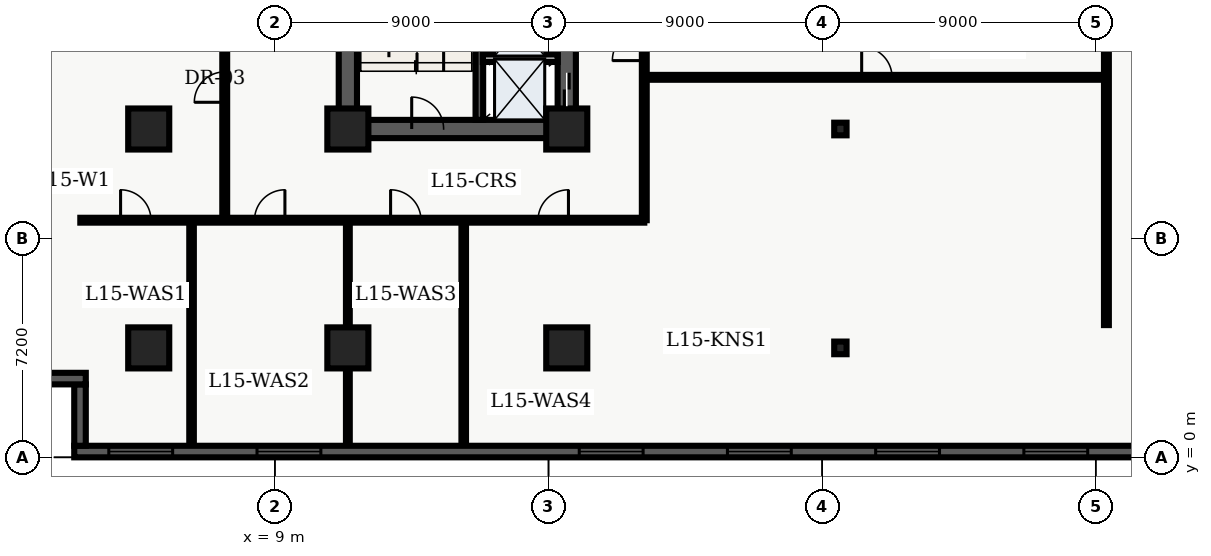
"""IFC4 building model, lengths in metres.
Left out: names, types, materials, properties, quantities, classifications, styles, units other than length and angle.
Written with IfcOpenShell. Run it as: python <this file> out.ifc"""

import sys

from ifc_helpers import new_model, entity, si_unit, converted_unit, direction, frame, origin_with_axes, origin_2d_with_axis, place, context, subcontext, project, spatial, polyline, rectangle, i_section, outline, extrude, element, fill, save


model = new_model("IFC4")
c1 = context("Model", 3, precision=1e-05, world=origin_with_axes(), true_north=direction((0.0, 1.0)))
c2 = subcontext(c1, "Body", "Model", "MODEL_VIEW")
j1 = project(units=[si_unit("LENGTHUNIT", "METRE"), converted_unit("PLANEANGLEUNIT", "DEGREE", entity("IfcPlaneAngleMeasure", 0.017), si_unit("PLANEANGLEUNIT", "RADIAN"), dimensions=[0, 0, 0, 0, 0, 0, 0])], contexts=[c1])
p1 = place(None, origin_with_axes())
s1 = spatial("IfcSite", under=j1, at=p1, CompositionType="ELEMENT")
p2 = place(p1, origin_with_axes())
s2 = spatial("IfcBuilding", under=s1, at=p2, CompositionType="ELEMENT")
p3 = place(p2, frame((0.0, 0.0, 63.9), z_axis=(0.0, 0.0, 1.0), x_axis=(1.0, 0.0, 0.0)))
s3 = spatial("IfcBuildingStorey", under=s2, at=p3, CompositionType="ELEMENT", Elevation=63.9)
p4 = place(p3, frame((11.4, 10.8, 0.0), z_axis=(0.0, 0.0, 1.0), x_axis=(0.0, 1.0, 0.0)))
e1 = element("IfcWall", 1, at=p4, inside=s3, PredefinedType="SHEAR", context=c2, shape_type="SweptSolid", body=[
    extrude(outline(polyline([(0.0, -0.3), (27.0, -0.3), (27.0, 0.3), (0.0, 0.3), (0.0, -0.3)])), origin_with_axes(), (0.0, 0.0, 1.0), 3.66),
])
p5 = place(p3, frame((11.4, 10.8, 0.0), z_axis=(0.0, 0.0, 1.0), x_axis=(1.0, 0.0, 0.0)))
e2 = element("IfcWall", 2, at=p5, inside=s3, PredefinedType="SHEAR", context=c2, shape_type="SweptSolid", body=[
    extrude(outline(polyline([(0.0, -0.3), (7.2, -0.3), (7.2, 0.3), (0.0, 0.3), (0.0, -0.3)])), origin_with_axes(), (0.0, 0.0, 1.0), 3.66),
])
p6 = place(p5, frame((2.625, 0.0, 0.0), z_axis=(0.0, 0.0, 1.0), x_axis=(1.0, 0.0, 0.0)))
e3 = element("IfcOpeningElement", 3, at=p6, cuts=e2, PredefinedType="OPENING", context=c2, shape_type="SweptSolid", body=[
    extrude(rectangle(XDim=1.05, YDim=0.62, at=origin_2d_with_axis()), origin_with_axes(), (0.0, 0.0, 1.0), 2.15),
])
p7 = place(p3, frame((18.6, 10.8, 0.0), z_axis=(0.0, 0.0, 1.0), x_axis=(0.0, 1.0, 0.0)))
e4 = element("IfcWall", 4, at=p7, inside=s3, PredefinedType="SHEAR", context=c2, shape_type="SweptSolid", body=[
    extrude(outline(polyline([(0.0, -0.3), (13.5, -0.3), (13.5, 0.3), (0.0, 0.3), (0.0, -0.3)])), origin_with_axes(), (0.0, 0.0, 1.0), 3.66),
])
p8 = place(p7, frame((1.3, 0.0, 0.0), z_axis=(0.0, 0.0, 1.0), x_axis=(1.0, 0.0, 0.0)))
e5 = element("IfcOpeningElement", 5, at=p8, cuts=e4, PredefinedType="OPENING", context=c2, shape_type="SweptSolid", body=[
    extrude(rectangle(XDim=1.1, YDim=0.62, at=origin_2d_with_axis()), origin_with_axes(), (0.0, 0.0, 1.0), 2.15),
])
p9 = place(p7, frame((3.4, 0.0, 0.0), z_axis=(0.0, 0.0, 1.0), x_axis=(1.0, 0.0, 0.0)))
e6 = element("IfcOpeningElement", 6, at=p9, cuts=e4, PredefinedType="OPENING", context=c2, shape_type="SweptSolid", body=[
    extrude(rectangle(XDim=1.1, YDim=0.62, at=origin_2d_with_axis()), origin_with_axes(), (0.0, 0.0, 1.0), 2.15),
])
p10 = place(p7, frame((11.125, 0.0, 0.0), z_axis=(0.0, 0.0, 1.0), x_axis=(1.0, 0.0, 0.0)))
e7 = element("IfcOpeningElement", 7, at=p10, cuts=e4, PredefinedType="OPENING", context=c2, shape_type="SweptSolid", body=[
    extrude(rectangle(XDim=1.05, YDim=0.62, at=origin_2d_with_axis()), origin_with_axes(), (0.0, 0.0, 1.0), 2.15),
])
p11 = place(p3, frame((15.725, 11.1, 0.0), z_axis=(0.0, 0.0, 1.0), x_axis=(0.0, 1.0, 0.0)))
e8 = element("IfcWall", 8, at=p11, inside=s3, PredefinedType="SHEAR", context=c2, shape_type="SweptSolid", body=[
    extrude(outline(polyline([(0.0, -0.125), (8.6, -0.125), (8.6, 0.125), (0.0, 0.125), (0.0, -0.125)])), origin_with_axes(), (0.0, 0.0, 1.0), 3.66),
])
for number, where, z_axis, x_axis in (
    (9, (11.4, 3.6, 0.0), (0.0, 0.0, 1.0), (1.0, 0.0, 0.0)),
    (10, (11.4, 10.8, 0.0), (0.0, 0.0, 1.0), (1.0, 0.0, 0.0)),
    (11, (18.6, 3.6, 0.0), (0.0, 0.0, 1.0), (1.0, 0.0, 0.0)),
    (12, (18.6, 10.8, 0.0), (0.0, 0.0, 1.0), (1.0, 0.0, 0.0)),
    (13, (4.85, 3.6, 0.0), (0.0, 0.0, 1.0), (1.0, 0.0, 0.0)),
    (14, (4.85, 10.8, 0.0), (0.0, 0.0, 1.0), (1.0, 0.0, 0.0)),
):
    element("IfcColumn", number, at=place(p3, frame(where, z_axis=z_axis, x_axis=x_axis)), inside=s3, PredefinedType="COLUMN", context=c2, shape_type="SweptSolid", body=[
        extrude(rectangle(XDim=1.35, YDim=1.35, at=origin_2d_with_axis()), origin_with_axes(), (0.0, 0.0, 1.0), 3.9),
    ])
for number, where, z_axis, x_axis in (
    (15, (27.6, 3.6, 0.0), (0.0, 0.0, 1.0), (1.0, 0.0, 0.0)),
    (16, (27.6, 10.8, 0.0), (0.0, 0.0, 1.0), (1.0, 0.0, 0.0)),
):
    element("IfcColumn", number, at=place(p3, frame(where, z_axis=z_axis, x_axis=x_axis)), inside=s3, PredefinedType="COLUMN", context=c2, shape_type="SweptSolid", body=[
        extrude(i_section(OverallWidth=0.406, OverallDepth=0.416, WebThickness=0.03, FlangeThickness=0.048, FilletRadius=0.022, at=origin_2d_with_axis()), origin_with_axes(), (0.0, 0.0, 1.0), 3.9),
    ])
p12 = place(p3, frame((15.84, 13.13, 0.0), z_axis=(0.0, 0.0, 1.0), x_axis=(1.0, 0.0, 0.0)))
e17 = element("IfcWall", 17, at=p12, inside=s3, PredefinedType="SOLIDWALL", context=c2, shape_type="SweptSolid", body=[
    extrude(outline(polyline([(0.0, -0.125), (2.46, -0.125), (2.46, 0.125), (0.0, 0.125), (0.0, -0.125)])), origin_with_axes(), (0.0, 0.0, 1.0), 2.7),
])
p13 = place(p3, frame((2.6, 7.8, 0.0), z_axis=(0.0, 0.0, 1.0), x_axis=(1.0, 0.0, 0.0)))
e18 = element("IfcWall", 18, at=p13, inside=s3, PredefinedType="PARTITIONING", context=c2, shape_type="SweptSolid", body=[
    extrude(outline(polyline([(0.0, -0.08), (18.55, -0.08), (18.55, 0.08), (0.0, 0.08), (0.0, -0.08)])), origin_with_axes(), (0.0, 0.0, 1.0), 2.7),
])
p14 = place(p13, frame((1.825, 0.0, 0.0), z_axis=(0.0, 0.0, 1.0), x_axis=(1.0, 0.0, 0.0)))
e19 = element("IfcOpeningElement", 19, at=p14, cuts=e18, PredefinedType="OPENING", context=c2, shape_type="SweptSolid", body=[
    extrude(rectangle(XDim=1.0, YDim=0.18, at=origin_2d_with_axis()), origin_with_axes(), (0.0, 0.0, 1.0), 2.15),
])
p15 = place(p13, frame((6.229, 0.0, 0.0), z_axis=(0.0, 0.0, 1.0), x_axis=(1.0, 0.0, 0.0)))
e20 = element("IfcOpeningElement", 20, at=p15, cuts=e18, PredefinedType="OPENING", context=c2, shape_type="SweptSolid", body=[
    extrude(rectangle(XDim=1.0, YDim=0.18, at=origin_2d_with_axis()), origin_with_axes(), (0.0, 0.0, 1.0), 2.15),
])
p16 = place(p13, frame((10.706, 0.0, 0.0), z_axis=(0.0, 0.0, 1.0), x_axis=(1.0, 0.0, 0.0)))
e21 = element("IfcOpeningElement", 21, at=p16, cuts=e18, PredefinedType="OPENING", context=c2, shape_type="SweptSolid", body=[
    extrude(rectangle(XDim=1.0, YDim=0.18, at=origin_2d_with_axis()), origin_with_axes(), (0.0, 0.0, 1.0), 2.15),
])
p17 = place(p13, frame((15.556, 0.0, 0.0), z_axis=(0.0, 0.0, 1.0), x_axis=(1.0, 0.0, 0.0)))
e22 = element("IfcOpeningElement", 22, at=p17, cuts=e18, PredefinedType="OPENING", context=c2, shape_type="SweptSolid", body=[
    extrude(rectangle(XDim=1.0, YDim=0.18, at=origin_2d_with_axis()), origin_with_axes(), (0.0, 0.0, 1.0), 2.15),
])
p18 = place(p3, frame((21.15, 7.8, 0.0), z_axis=(0.0, 0.0, 1.0), x_axis=(0.0, 1.0, 0.0)))
e23 = element("IfcWall", 23, at=p18, inside=s3, PredefinedType="PARTITIONING", context=c2, shape_type="SweptSolid", body=[
    extrude(outline(polyline([(0.0, -0.08), (32.7, -0.08), (32.7, 0.08), (0.0, 0.08), (0.0, -0.08)])), origin_with_axes(), (0.0, 0.0, 1.0), 2.7),
])
p19 = place(p18, frame((5.775, 0.0, 0.0), z_axis=(0.0, 0.0, 1.0), x_axis=(1.0, 0.0, 0.0)))
e24 = element("IfcOpeningElement", 24, at=p19, cuts=e23, PredefinedType="OPENING", context=c2, shape_type="SweptSolid", body=[
    extrude(rectangle(XDim=1.05, YDim=0.18, at=origin_2d_with_axis()), origin_with_axes(), (0.0, 0.0, 1.0), 2.15),
])
p20 = place(p3, frame((7.35, 7.8, 0.0), z_axis=(0.0, 0.0, 1.0), x_axis=(0.0, 1.0, 0.0)))
e25 = element("IfcWall", 25, at=p20, inside=s3, PredefinedType="PARTITIONING", context=c2, shape_type="SweptSolid", body=[
    extrude(outline(polyline([(0.0, -0.08), (32.7, -0.08), (32.7, 0.08), (0.0, 0.08), (0.0, -0.08)])), origin_with_axes(), (0.0, 0.0, 1.0), 2.7),
])
p21 = place(p20, frame((4.379, 0.0, 0.0), z_axis=(0.0, 0.0, 1.0), x_axis=(1.0, 0.0, 0.0)))
e26 = element("IfcOpeningElement", 26, at=p21, cuts=e25, PredefinedType="OPENING", context=c2, shape_type="SweptSolid", body=[
    extrude(rectangle(XDim=1.0, YDim=0.18, at=origin_2d_with_axis()), origin_with_axes(), (0.0, 0.0, 1.0), 2.15),
])
p22 = place(p20, frame((14.008, 0.0, 0.0), z_axis=(0.0, 0.0, 1.0), x_axis=(1.0, 0.0, 0.0)))
e27 = element("IfcOpeningElement", 27, at=p22, cuts=e25, PredefinedType="OPENING", context=c2, shape_type="SweptSolid", body=[
    extrude(rectangle(XDim=1.0, YDim=0.18, at=origin_2d_with_axis()), origin_with_axes(), (0.0, 0.0, 1.0), 2.15),
])
p23 = place(p20, frame((25.979, 0.0, 0.0), z_axis=(0.0, 0.0, 1.0), x_axis=(1.0, 0.0, 0.0)))
e28 = element("IfcOpeningElement", 28, at=p23, cuts=e25, PredefinedType="OPENING", context=c2, shape_type="SweptSolid", body=[
    extrude(rectangle(XDim=1.0, YDim=0.18, at=origin_2d_with_axis()), origin_with_axes(), (0.0, 0.0, 1.0), 2.15),
])
p24 = place(p3, frame((6.259, 0.36, 0.0), z_axis=(0.0, 0.0, 1.0), x_axis=(0.0, 1.0, 0.0)))
e29 = element("IfcWall", 29, at=p24, inside=s3, PredefinedType="PARTITIONING", context=c2, shape_type="SweptSolid", body=[
    extrude(outline(polyline([(0.0, -0.075), (7.34, -0.075), (7.34, 0.075), (0.0, 0.075), (0.0, -0.075)])), origin_with_axes(), (0.0, 0.0, 1.0), 2.7),
])
p25 = place(p3, frame((11.4, 0.36, 0.0), z_axis=(0.0, 0.0, 1.0), x_axis=(0.0, 1.0, 0.0)))
e30 = element("IfcWall", 30, at=p25, inside=s3, PredefinedType="PARTITIONING", context=c2, shape_type="SweptSolid", body=[
    extrude(outline(polyline([(0.0, -0.062), (7.34, -0.062), (7.34, 0.062), (0.0, 0.062), (0.0, -0.062)])), origin_with_axes(), (0.0, 0.0, 1.0), 2.7),
])
p26 = place(p3, frame((15.211, 0.36, 0.0), z_axis=(0.0, 0.0, 1.0), x_axis=(0.0, 1.0, 0.0)))
e31 = element("IfcWall", 31, at=p26, inside=s3, PredefinedType="PARTITIONING", context=c2, shape_type="SweptSolid", body=[
    extrude(outline(polyline([(0.0, -0.075), (7.34, -0.075), (7.34, 0.075), (0.0, 0.075), (0.0, -0.075)])), origin_with_axes(), (0.0, 0.0, 1.0), 2.7),
])
p27 = place(p3, frame((21.15, 12.5, 0.0), z_axis=(0.0, 0.0, 1.0), x_axis=(1.0, 0.0, 0.0)))
e32 = element("IfcWall", 32, at=p27, inside=s3, PredefinedType="PARTITIONING", context=c2, shape_type="SweptSolid", body=[
    extrude(outline(polyline([(0.0, -0.08), (15.2, -0.08), (15.2, 0.08), (0.0, 0.08), (0.0, -0.08)])), origin_with_axes(), (0.0, 0.0, 1.0), 2.7),
])
p28 = place(p27, frame((7.65, 0.0, 0.0), z_axis=(0.0, 0.0, 1.0), x_axis=(1.0, 0.0, 0.0)))
e33 = element("IfcOpeningElement", 33, at=p28, cuts=e32, PredefinedType="OPENING", context=c2, shape_type="SweptSolid", body=[
    extrude(rectangle(XDim=1.0, YDim=0.18, at=origin_2d_with_axis()), origin_with_axes(), (0.0, 0.0, 1.0), 2.15),
])
p29 = place(p3, frame((36.35, 4.35, 0.0), z_axis=(0.0, 0.0, 1.0), x_axis=(0.0, 1.0, 0.0)))
e34 = element("IfcWall", 34, at=p29, inside=s3, PredefinedType="PARTITIONING", context=c2, shape_type="SweptSolid", body=[
    extrude(outline(polyline([(0.0, -0.08), (16.95, -0.08), (16.95, 0.08), (0.0, 0.08), (0.0, -0.08)])), origin_with_axes(), (0.0, 0.0, 1.0), 2.7),
])
p30 = place(p3, frame((57.22, 0.19, 0.0), z_axis=(0.0, 0.0, 1.0), x_axis=(-1.0, 0.0, 0.0)))
e35 = element("IfcWall", 35, at=p30, inside=s3, PredefinedType="SOLIDWALL", context=c2, shape_type="SweptSolid", body=[
    extrude(outline(polyline([(0.0, -0.19), (54.82, -0.19), (54.82, 0.19), (0.0, 0.19), (0.0, -0.19)])), origin_with_axes(), (0.0, 0.0, 1.0), 3.66),
])
p31 = place(p30, frame((3.037, 0.0, 0.45), z_axis=(0.0, 0.0, 1.0), x_axis=(1.0, 0.0, 0.0)))
e36 = element("IfcOpeningElement", 36, at=p31, cuts=e35, PredefinedType="OPENING", context=c2, shape_type="SweptSolid", body=[
    extrude(rectangle(XDim=2.1, YDim=0.4, at=origin_2d_with_axis()), origin_with_axes(), (0.0, 0.0, 1.0), 2.2),
])
p32 = place(p30, frame((7.912, 0.0, 0.45), z_axis=(0.0, 0.0, 1.0), x_axis=(1.0, 0.0, 0.0)))
e37 = element("IfcOpeningElement", 37, at=p32, cuts=e35, PredefinedType="OPENING", context=c2, shape_type="SweptSolid", body=[
    extrude(rectangle(XDim=2.1, YDim=0.4, at=origin_2d_with_axis()), origin_with_axes(), (0.0, 0.0, 1.0), 2.2),
])
p33 = place(p30, frame((12.786, 0.0, 0.45), z_axis=(0.0, 0.0, 1.0), x_axis=(1.0, 0.0, 0.0)))
e38 = element("IfcOpeningElement", 38, at=p33, cuts=e35, PredefinedType="OPENING", context=c2, shape_type="SweptSolid", body=[
    extrude(rectangle(XDim=2.1, YDim=0.4, at=origin_2d_with_axis()), origin_with_axes(), (0.0, 0.0, 1.0), 2.2),
])
p34 = place(p30, frame((17.661, 0.0, 0.45), z_axis=(0.0, 0.0, 1.0), x_axis=(1.0, 0.0, 0.0)))
e39 = element("IfcOpeningElement", 39, at=p34, cuts=e35, PredefinedType="OPENING", context=c2, shape_type="SweptSolid", body=[
    extrude(rectangle(XDim=2.1, YDim=0.4, at=origin_2d_with_axis()), origin_with_axes(), (0.0, 0.0, 1.0), 2.2),
])
p35 = place(p30, frame((22.535, 0.0, 0.45), z_axis=(0.0, 0.0, 1.0), x_axis=(1.0, 0.0, 0.0)))
e40 = element("IfcOpeningElement", 40, at=p35, cuts=e35, PredefinedType="OPENING", context=c2, shape_type="SweptSolid", body=[
    extrude(rectangle(XDim=2.1, YDim=0.4, at=origin_2d_with_axis()), origin_with_axes(), (0.0, 0.0, 1.0), 2.2),
])
p36 = place(p30, frame((27.41, 0.0, 0.45), z_axis=(0.0, 0.0, 1.0), x_axis=(1.0, 0.0, 0.0)))
e41 = element("IfcOpeningElement", 41, at=p36, cuts=e35, PredefinedType="OPENING", context=c2, shape_type="SweptSolid", body=[
    extrude(rectangle(XDim=2.1, YDim=0.4, at=origin_2d_with_axis()), origin_with_axes(), (0.0, 0.0, 1.0), 2.2),
])
p37 = place(p30, frame((32.285, 0.0, 0.45), z_axis=(0.0, 0.0, 1.0), x_axis=(1.0, 0.0, 0.0)))
e42 = element("IfcOpeningElement", 42, at=p37, cuts=e35, PredefinedType="OPENING", context=c2, shape_type="SweptSolid", body=[
    extrude(rectangle(XDim=2.1, YDim=0.4, at=origin_2d_with_axis()), origin_with_axes(), (0.0, 0.0, 1.0), 2.2),
])
p38 = place(p30, frame((37.159, 0.0, 0.45), z_axis=(0.0, 0.0, 1.0), x_axis=(1.0, 0.0, 0.0)))
e43 = element("IfcOpeningElement", 43, at=p38, cuts=e35, PredefinedType="OPENING", context=c2, shape_type="SweptSolid", body=[
    extrude(rectangle(XDim=2.1, YDim=0.4, at=origin_2d_with_axis()), origin_with_axes(), (0.0, 0.0, 1.0), 2.2),
])
p39 = place(p30, frame((47.758, 0.0, 0.45), z_axis=(0.0, 0.0, 1.0), x_axis=(1.0, 0.0, 0.0)))
e44 = element("IfcOpeningElement", 44, at=p39, cuts=e35, PredefinedType="OPENING", context=c2, shape_type="SweptSolid", body=[
    extrude(rectangle(XDim=2.1, YDim=0.4, at=origin_2d_with_axis()), origin_with_axes(), (0.0, 0.0, 1.0), 2.2),
])
p40 = place(p30, frame((52.633, 0.0, 0.45), z_axis=(0.0, 0.0, 1.0), x_axis=(1.0, 0.0, 0.0)))
e45 = element("IfcOpeningElement", 45, at=p40, cuts=e35, PredefinedType="OPENING", context=c2, shape_type="SweptSolid", body=[
    extrude(rectangle(XDim=2.1, YDim=0.4, at=origin_2d_with_axis()), origin_with_axes(), (0.0, 0.0, 1.0), 2.2),
])
p41 = place(p3, frame((2.59, 0.38, 0.0), z_axis=(0.0, 0.0, 1.0), x_axis=(0.0, 1.0, 0.0)))
e46 = element("IfcWall", 46, at=p41, inside=s3, PredefinedType="SOLIDWALL", context=c2, shape_type="SweptSolid", body=[
    extrude(outline(polyline([(0.0, -0.19), (2.02, -0.19), (2.02, 0.19), (0.0, 0.19), (0.0, -0.19)])), origin_with_axes(), (0.0, 0.0, 1.0), 3.66),
])
p42 = place(p3, frame((2.78, 2.59, 0.0), z_axis=(0.0, 0.0, 1.0), x_axis=(-1.0, 0.0, 0.0)))
e47 = element("IfcWall", 47, at=p42, inside=s3, PredefinedType="SOLIDWALL", context=c2, shape_type="SweptSolid", body=[
    extrude(outline(polyline([(0.0, -0.19), (2.78, -0.19), (2.78, 0.19), (0.0, 0.19), (0.0, -0.19)])), origin_with_axes(), (0.0, 0.0, 1.0), 3.66),
])
p43 = place(p7, frame((1.3, 0.0, 0.0), z_axis=(0.0, 0.0, 1.0), x_axis=(1.0, 0.0, 0.0)))
e48 = element("IfcDoor", 48, at=p43, inside=s3, OperationType="SLIDING_TO_LEFT", PredefinedType="DOOR", context=c2, shape_type="SweptSolid", body=[
    extrude(rectangle(XDim=1.1, YDim=0.09, at=origin_2d_with_axis()), origin_with_axes(), (0.0, 0.0, 1.0), 2.15),
])
fill(e5, e48)
p44 = place(p5, frame((2.625, 0.0, 0.0), z_axis=(0.0, 0.0, 1.0), x_axis=(1.0, 0.0, 0.0)))
e49 = element("IfcDoor", 49, at=p44, inside=s3, OperationType="SINGLE_SWING_LEFT", PredefinedType="DOOR", context=c2, shape_type="SweptSolid", body=[
    extrude(rectangle(XDim=1.05, YDim=0.09, at=origin_2d_with_axis()), origin_with_axes(), (0.0, 0.0, 1.0), 2.15),
])
fill(e3, e49)
p45 = place(p20, frame((4.379, 0.0, 0.0), z_axis=(0.0, 0.0, 1.0), x_axis=(1.0, 0.0, 0.0)))
e50 = element("IfcDoor", 50, at=p45, inside=s3, OperationType="SINGLE_SWING_LEFT", PredefinedType="DOOR", context=c2, shape_type="SweptSolid", body=[
    extrude(rectangle(XDim=1.0, YDim=0.09, at=origin_2d_with_axis()), origin_with_axes(), (0.0, 0.0, 1.0), 2.15),
])
fill(e26, e50)
p46 = place(p13, frame((1.825, 0.0, 0.0), z_axis=(0.0, 0.0, 1.0), x_axis=(1.0, 0.0, 0.0)))
e51 = element("IfcDoor", 51, at=p46, inside=s3, OperationType="SINGLE_SWING_LEFT", PredefinedType="DOOR", context=c2, shape_type="SweptSolid", body=[
    extrude(rectangle(XDim=1.0, YDim=0.09, at=origin_2d_with_axis()), origin_with_axes(), (0.0, 0.0, 1.0), 2.15),
])
fill(e19, e51)
p47 = place(p13, frame((6.229, 0.0, 0.0), z_axis=(0.0, 0.0, 1.0), x_axis=(1.0, 0.0, 0.0)))
e52 = element("IfcDoor", 52, at=p47, inside=s3, OperationType="SINGLE_SWING_RIGHT", PredefinedType="DOOR", context=c2, shape_type="SweptSolid", body=[
    extrude(rectangle(XDim=1.0, YDim=0.09, at=origin_2d_with_axis()), origin_with_axes(), (0.0, 0.0, 1.0), 2.15),
])
fill(e20, e52)
p48 = place(p13, frame((10.706, 0.0, 0.0), z_axis=(0.0, 0.0, 1.0), x_axis=(1.0, 0.0, 0.0)))
e53 = element("IfcDoor", 53, at=p48, inside=s3, OperationType="SINGLE_SWING_LEFT", PredefinedType="DOOR", context=c2, shape_type="SweptSolid", body=[
    extrude(rectangle(XDim=1.0, YDim=0.09, at=origin_2d_with_axis()), origin_with_axes(), (0.0, 0.0, 1.0), 2.15),
])
fill(e21, e53)
p49 = place(p13, frame((15.556, 0.0, 0.0), z_axis=(0.0, 0.0, 1.0), x_axis=(1.0, 0.0, 0.0)))
e54 = element("IfcDoor", 54, at=p49, inside=s3, OperationType="SINGLE_SWING_RIGHT", PredefinedType="DOOR", context=c2, shape_type="SweptSolid", body=[
    extrude(rectangle(XDim=1.0, YDim=0.09, at=origin_2d_with_axis()), origin_with_axes(), (0.0, 0.0, 1.0), 2.15),
])
fill(e22, e54)
p50 = place(p18, frame((5.775, 0.0, 0.0), z_axis=(0.0, 0.0, 1.0), x_axis=(1.0, 0.0, 0.0)))
e55 = element("IfcDoor", 55, at=p50, inside=s3, OperationType="SINGLE_SWING_LEFT", PredefinedType="DOOR", context=c2, shape_type="SweptSolid", body=[
    extrude(rectangle(XDim=1.05, YDim=0.09, at=origin_2d_with_axis()), origin_with_axes(), (0.0, 0.0, 1.0), 2.15),
])
fill(e24, e55)
p51 = place(p27, frame((7.65, 0.0, 0.0), z_axis=(0.0, 0.0, 1.0), x_axis=(1.0, 0.0, 0.0)))
e56 = element("IfcDoor", 56, at=p51, inside=s3, OperationType="SINGLE_SWING_LEFT", PredefinedType="DOOR", context=c2, shape_type="SweptSolid", body=[
    extrude(rectangle(XDim=1.0, YDim=0.09, at=origin_2d_with_axis()), origin_with_axes(), (0.0, 0.0, 1.0), 2.15),
])
fill(e33, e56)
p52 = place(p30, frame((22.535, 0.0, 0.45), z_axis=(0.0, 0.0, 1.0), x_axis=(1.0, 0.0, 0.0)))
e57 = element("IfcWindow", 57, at=p52, inside=s3, PredefinedType="WINDOW", context=c2, shape_type="SweptSolid", body=[
    extrude(rectangle(XDim=2.1, YDim=0.09, at=origin_2d_with_axis()), origin_with_axes(), (0.0, 0.0, 1.0), 2.2),
])
fill(e40, e57)
p53 = place(p30, frame((27.41, 0.0, 0.45), z_axis=(0.0, 0.0, 1.0), x_axis=(1.0, 0.0, 0.0)))
e58 = element("IfcWindow", 58, at=p53, inside=s3, PredefinedType="WINDOW", context=c2, shape_type="SweptSolid", body=[
    extrude(rectangle(XDim=2.1, YDim=0.09, at=origin_2d_with_axis()), origin_with_axes(), (0.0, 0.0, 1.0), 2.2),
])
fill(e41, e58)
p54 = place(p30, frame((32.285, 0.0, 0.45), z_axis=(0.0, 0.0, 1.0), x_axis=(1.0, 0.0, 0.0)))
e59 = element("IfcWindow", 59, at=p54, inside=s3, PredefinedType="WINDOW", context=c2, shape_type="SweptSolid", body=[
    extrude(rectangle(XDim=2.1, YDim=0.09, at=origin_2d_with_axis()), origin_with_axes(), (0.0, 0.0, 1.0), 2.2),
])
fill(e42, e59)
p55 = place(p30, frame((37.159, 0.0, 0.45), z_axis=(0.0, 0.0, 1.0), x_axis=(1.0, 0.0, 0.0)))
e60 = element("IfcWindow", 60, at=p55, inside=s3, PredefinedType="WINDOW", context=c2, shape_type="SweptSolid", body=[
    extrude(rectangle(XDim=2.1, YDim=0.09, at=origin_2d_with_axis()), origin_with_axes(), (0.0, 0.0, 1.0), 2.2),
])
fill(e43, e60)
p56 = place(p30, frame((47.758, 0.0, 0.45), z_axis=(0.0, 0.0, 1.0), x_axis=(1.0, 0.0, 0.0)))
e61 = element("IfcWindow", 61, at=p56, inside=s3, PredefinedType="WINDOW", context=c2, shape_type="SweptSolid", body=[
    extrude(rectangle(XDim=2.1, YDim=0.09, at=origin_2d_with_axis()), origin_with_axes(), (0.0, 0.0, 1.0), 2.2),
])
fill(e44, e61)
p57 = place(p30, frame((52.633, 0.0, 0.45), z_axis=(0.0, 0.0, 1.0), x_axis=(1.0, 0.0, 0.0)))
e62 = element("IfcWindow", 62, at=p57, inside=s3, PredefinedType="WINDOW", context=c2, shape_type="SweptSolid", body=[
    extrude(rectangle(XDim=2.1, YDim=0.09, at=origin_2d_with_axis()), origin_with_axes(), (0.0, 0.0, 1.0), 2.2),
])
fill(e45, e62)
save(model, sys.argv[1])
